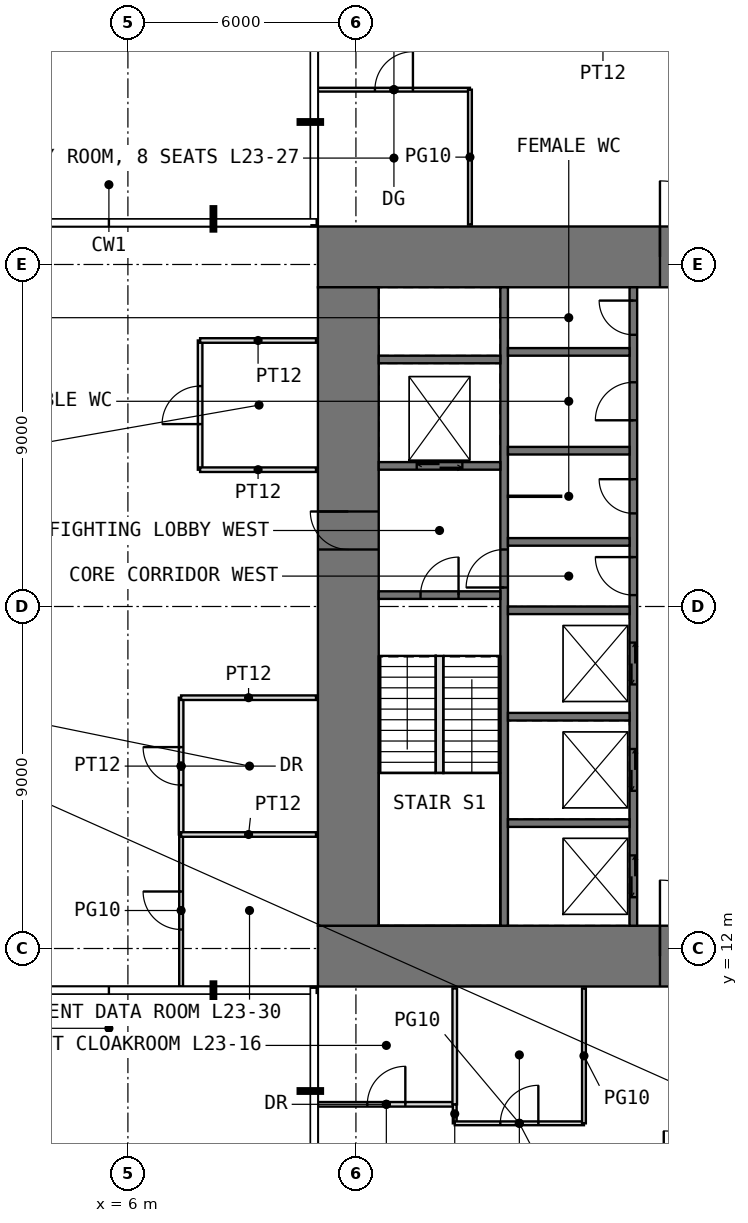
"""IFC4 building model, lengths in metres.
Left out: names, types, materials, properties, quantities, classifications, styles, units other than length and angle.
Written with IfcOpenShell. Run it as: python <this file> out.ifc"""

import sys

from ifc_helpers import new_model, si_unit, direction, frame, frame_2d, origin, place, context, subcontext, project, spatial, rectangle, extrude, element, fill, save


model = new_model("IFC4")
c1 = context("Model", 3, precision=1e-05, world=origin(), true_north=direction((0.0, 1.0)))
c2 = subcontext(c1, "Body", "Model", "MODEL_VIEW")
j1 = project(units=[si_unit("LENGTHUNIT", "METRE"), si_unit("PLANEANGLEUNIT", "RADIAN")], contexts=[c1])
p1 = place(None, origin())
s1 = spatial("IfcSite", under=j1, at=p1, CompositionType="ELEMENT")
p2 = place(p1, origin())
s2 = spatial("IfcBuilding", under=s1, at=p2, CompositionType="ELEMENT")
p3 = place(p2, frame((0.0, 0.0, 100.5)))
s3 = spatial("IfcBuildingStorey", under=s2, at=p3, CompositionType="ELEMENT", Elevation=100.5)
p4 = place(p3, frame((11.0, 11.8, -0.05), z_axis=(0.0, 0.0, 1.0), x_axis=(1.0, 0.0, 0.0)))
e1 = element("IfcWall", 1, at=p4, inside=s3, PredefinedType="SHEAR", context=c2, shape_type="SweptSolid", body=[
    extrude(rectangle(XDim=20.0, YDim=1.6, at=frame_2d((10.0, 0.0))), origin(), (0.0, 0.0, 1.0), 4.0),
])
p5 = place(p4, frame((9.0, 0.0, 0.05)))
e2 = element("IfcOpeningElement", 2, at=p5, cuts=e1, PredefinedType="OPENING", context=c2, shape_type="SweptSolid", body=[
    extrude(rectangle(XDim=2.0, YDim=2.2, at=frame_2d((1.0, 1.1))), frame((0.0, 0.81, 0.0), z_axis=(0.0, -1.0, 0.0), x_axis=(1.0, 0.0, 0.0)), (0.0, 0.0, 1.0), 1.62),
])
p6 = place(p3, frame((11.0, 30.2, -0.05), z_axis=(0.0, 0.0, 1.0), x_axis=(1.0, 0.0, 0.0)))
e3 = element("IfcWall", 3, at=p6, inside=s3, PredefinedType="SHEAR", context=c2, shape_type="SweptSolid", body=[
    extrude(rectangle(XDim=20.0, YDim=1.6, at=frame_2d((10.0, 0.0))), origin(), (0.0, 0.0, 1.0), 4.0),
])
p7 = place(p6, frame((9.0, 0.0, 0.05)))
e4 = element("IfcOpeningElement", 4, at=p7, cuts=e3, PredefinedType="OPENING", context=c2, shape_type="SweptSolid", body=[
    extrude(rectangle(XDim=2.0, YDim=2.2, at=frame_2d((1.0, 1.1))), frame((0.0, 0.81, 0.0), z_axis=(0.0, -1.0, 0.0), x_axis=(1.0, 0.0, 0.0)), (0.0, 0.0, 1.0), 1.62),
])
p8 = place(p3, frame((11.8, 12.6, -0.05), z_axis=(0.0, 0.0, 1.0), x_axis=(0.0, 1.0, 0.0)))
e5 = element("IfcWall", 5, at=p8, inside=s3, PredefinedType="SHEAR", context=c2, shape_type="SweptSolid", body=[
    extrude(rectangle(XDim=16.8, YDim=1.6, at=frame_2d((8.4, 0.0))), origin(), (0.0, 0.0, 1.0), 4.0),
])
p9 = place(p8, frame((9.9, 0.0, 0.05)))
e6 = element("IfcOpeningElement", 6, at=p9, cuts=e5, PredefinedType="OPENING", context=c2, shape_type="SweptSolid", body=[
    extrude(rectangle(XDim=1.0, YDim=2.2, at=frame_2d((0.5, 1.1))), frame((0.0, 0.81, 0.0), z_axis=(0.0, -1.0, 0.0), x_axis=(1.0, 0.0, 0.0)), (0.0, 0.0, 1.0), 1.62),
])
p10 = place(p3, frame((15.9, 12.6, -0.05), z_axis=(0.0, 0.0, 1.0), x_axis=(0.0, 1.0, 0.0)))
e7 = element("IfcWall", 7, at=p10, inside=s3, PredefinedType="SHEAR", context=c2, shape_type="SweptSolid", body=[
    extrude(rectangle(XDim=16.8, YDim=0.2, at=frame_2d((8.4, 0.0))), origin(), (0.0, 0.0, 1.0), 4.0),
])
p11 = place(p10, frame((8.9, 0.0, 0.05)))
e8 = element("IfcOpeningElement", 8, at=p11, cuts=e7, PredefinedType="OPENING", context=c2, shape_type="SweptSolid", body=[
    extrude(rectangle(XDim=1.0, YDim=2.2, at=frame_2d((0.5, 1.1))), frame((0.0, 0.11, 0.0), z_axis=(0.0, -1.0, 0.0), x_axis=(1.0, 0.0, 0.0)), (0.0, 0.0, 1.0), 0.22),
])
p12 = place(p3, frame((19.3, 12.6, -0.05), z_axis=(0.0, 0.0, 1.0), x_axis=(0.0, 1.0, 0.0)))
e9 = element("IfcWall", 9, at=p12, inside=s3, PredefinedType="SHEAR", context=c2, shape_type="SweptSolid", body=[
    extrude(rectangle(XDim=16.8, YDim=0.2, at=frame_2d((8.4, 0.0))), origin(), (0.0, 0.0, 1.0), 4.0),
])
p13 = place(p12, frame((8.7, 0.0, 0.05)))
e10 = element("IfcOpeningElement", 10, at=p13, cuts=e9, PredefinedType="OPENING", context=c2, shape_type="SweptSolid", body=[
    extrude(rectangle(XDim=1.0, YDim=2.2, at=frame_2d((0.5, 1.1))), frame((0.0, 0.11, 0.0), z_axis=(0.0, -1.0, 0.0), x_axis=(1.0, 0.0, 0.0)), (0.0, 0.0, 1.0), 0.22),
])
p14 = place(p12, frame((10.85, 0.0, 0.05)))
e11 = element("IfcOpeningElement", 11, at=p14, cuts=e9, PredefinedType="OPENING", context=c2, shape_type="SweptSolid", body=[
    extrude(rectangle(XDim=0.9, YDim=2.2, at=frame_2d((0.45, 1.1))), frame((0.0, 0.11, 0.0), z_axis=(0.0, -1.0, 0.0), x_axis=(1.0, 0.0, 0.0)), (0.0, 0.0, 1.0), 0.22),
])
p15 = place(p12, frame((13.3, 0.0, 0.05)))
e12 = element("IfcOpeningElement", 12, at=p15, cuts=e9, PredefinedType="OPENING", context=c2, shape_type="SweptSolid", body=[
    extrude(rectangle(XDim=1.0, YDim=2.2, at=frame_2d((0.5, 1.1))), frame((0.0, 0.11, 0.0), z_axis=(0.0, -1.0, 0.0), x_axis=(1.0, 0.0, 0.0)), (0.0, 0.0, 1.0), 0.22),
])
p16 = place(p12, frame((15.55, 0.0, 0.05)))
e13 = element("IfcOpeningElement", 13, at=p16, cuts=e9, PredefinedType="OPENING", context=c2, shape_type="SweptSolid", body=[
    extrude(rectangle(XDim=0.9, YDim=2.2, at=frame_2d((0.45, 1.1))), frame((0.0, 0.11, 0.0), z_axis=(0.0, -1.0, 0.0), x_axis=(1.0, 0.0, 0.0)), (0.0, 0.0, 1.0), 0.22),
])
p17 = place(p12, frame((0.75, 0.0, 0.05)))
e14 = element("IfcOpeningElement", 14, at=p17, cuts=e9, PredefinedType="OPENING", context=c2, shape_type="SweptSolid", body=[
    extrude(rectangle(XDim=1.1, YDim=2.2, at=frame_2d((0.55, 1.1))), frame((0.0, 0.11, 0.0), z_axis=(0.0, -1.0, 0.0), x_axis=(1.0, 0.0, 0.0)), (0.0, 0.0, 1.0), 0.22),
])
p18 = place(p12, frame((3.55, 0.0, 0.05)))
e15 = element("IfcOpeningElement", 15, at=p18, cuts=e9, PredefinedType="OPENING", context=c2, shape_type="SweptSolid", body=[
    extrude(rectangle(XDim=1.1, YDim=2.2, at=frame_2d((0.55, 1.1))), frame((0.0, 0.11, 0.0), z_axis=(0.0, -1.0, 0.0), x_axis=(1.0, 0.0, 0.0)), (0.0, 0.0, 1.0), 0.22),
])
p19 = place(p12, frame((6.35, 0.0, 0.05)))
e16 = element("IfcOpeningElement", 16, at=p19, cuts=e9, PredefinedType="OPENING", context=c2, shape_type="SweptSolid", body=[
    extrude(rectangle(XDim=1.1, YDim=2.2, at=frame_2d((0.55, 1.1))), frame((0.0, 0.11, 0.0), z_axis=(0.0, -1.0, 0.0), x_axis=(1.0, 0.0, 0.0)), (0.0, 0.0, 1.0), 0.22),
])
p20 = place(p3, frame((12.6, 21.3, -0.05), z_axis=(0.0, 0.0, 1.0), x_axis=(1.0, 0.0, 0.0)))
e17 = element("IfcWall", 17, at=p20, inside=s3, PredefinedType="SHEAR", context=c2, shape_type="SweptSolid", body=[
    extrude(rectangle(XDim=3.2, YDim=0.2, at=frame_2d((1.6, 0.0))), origin(), (0.0, 0.0, 1.0), 4.0),
])
p21 = place(p20, frame((1.1, 0.0, 0.05)))
e18 = element("IfcOpeningElement", 18, at=p21, cuts=e17, PredefinedType="OPENING", context=c2, shape_type="SweptSolid", body=[
    extrude(rectangle(XDim=1.0, YDim=2.2, at=frame_2d((0.5, 1.1))), frame((0.0, 0.11, 0.0), z_axis=(0.0, -1.0, 0.0), x_axis=(1.0, 0.0, 0.0)), (0.0, 0.0, 1.0), 0.22),
])
p22 = place(p3, frame((12.6, 24.7, -0.05), z_axis=(0.0, 0.0, 1.0), x_axis=(1.0, 0.0, 0.0)))
e19 = element("IfcWall", 19, at=p22, inside=s3, PredefinedType="SHEAR", context=c2, shape_type="SweptSolid", body=[
    extrude(rectangle(XDim=3.2, YDim=0.2, at=frame_2d((1.6, 0.0))), origin(), (0.0, 0.0, 1.0), 4.0),
])
p23 = place(p22, frame((1.0, 0.0, 0.05)))
e20 = element("IfcOpeningElement", 20, at=p23, cuts=e19, PredefinedType="OPENING", context=c2, shape_type="SweptSolid", body=[
    extrude(rectangle(XDim=1.2, YDim=2.2, at=frame_2d((0.6, 1.1))), frame((0.0, 0.11, 0.0), z_axis=(0.0, -1.0, 0.0), x_axis=(1.0, 0.0, 0.0)), (0.0, 0.0, 1.0), 0.22),
])
for number, where, z_axis, x_axis in (
    (21, (12.6, 27.5, -0.05), (0.0, 0.0, 1.0), (1.0, 0.0, 0.0)),
    (22, (16.0, 15.3, -0.05), (0.0, 0.0, 1.0), (1.0, 0.0, 0.0)),
    (23, (16.0, 18.1, -0.05), (0.0, 0.0, 1.0), (1.0, 0.0, 0.0)),
    (24, (16.0, 20.9, -0.05), (0.0, 0.0, 1.0), (1.0, 0.0, 0.0)),
    (25, (16.0, 22.7, -0.05), (0.0, 0.0, 1.0), (1.0, 0.0, 0.0)),
    (26, (16.0, 25.1, -0.05), (0.0, 0.0, 1.0), (1.0, 0.0, 0.0)),
    (27, (16.0, 27.7, -0.05), (0.0, 0.0, 1.0), (1.0, 0.0, 0.0)),
):
    element("IfcWall", number, at=place(p3, frame(where, z_axis=z_axis, x_axis=x_axis)), inside=s3, PredefinedType="SHEAR", context=c2, shape_type="SweptSolid", body=[
        extrude(rectangle(XDim=3.2, YDim=0.2, at=frame_2d((1.6, 0.0))), origin(), (0.0, 0.0, 1.0), 4.0),
    ])
p24 = place(p3, frame((16.0, 23.9, 0.0), z_axis=(0.0, 0.0, 1.0), x_axis=(1.0, 0.0, 0.0)))
e28 = element("IfcWall", 28, at=p24, inside=s3, PredefinedType="PARTITIONING", context=c2, shape_type="SweptSolid", body=[
    extrude(rectangle(XDim=1.4, YDim=0.03, at=frame_2d((0.7, 0.0))), origin(), (0.0, 0.0, 1.0), 3.75),
])
p25 = place(p3, frame((7.4, 11.0, 0.0), z_axis=(0.0, 0.0, 1.0), x_axis=(0.0, 1.0, 0.0)))
e29 = element("IfcWall", 29, at=p25, inside=s3, PredefinedType="PARTITIONING", context=c2, shape_type="SweptSolid", body=[
    extrude(rectangle(XDim=4.0, YDim=0.1, at=frame_2d((2.0, 0.0))), origin(), (0.0, 0.0, 1.0), 3.75),
])
p26 = place(p25, frame((1.5, 0.0, 0.0)))
e30 = element("IfcOpeningElement", 30, at=p26, cuts=e29, PredefinedType="OPENING", context=c2, shape_type="SweptSolid", body=[
    extrude(rectangle(XDim=1.0, YDim=2.4, at=frame_2d((0.5, 1.2))), frame((0.0, 0.06, 0.0), z_axis=(0.0, -1.0, 0.0), x_axis=(1.0, 0.0, 0.0)), (0.0, 0.0, 1.0), 0.12),
])
p27 = place(p3, frame((7.4, 15.0, 0.0), z_axis=(0.0, 0.0, 1.0), x_axis=(0.0, 1.0, 0.0)))
e31 = element("IfcWall", 31, at=p27, inside=s3, PredefinedType="PARTITIONING", context=c2, shape_type="SweptSolid", body=[
    extrude(rectangle(XDim=3.6, YDim=0.12, at=frame_2d((1.8, 0.0))), origin(), (0.0, 0.0, 1.0), 3.75),
])
p28 = place(p27, frame((1.3, 0.0, 0.0)))
e32 = element("IfcOpeningElement", 32, at=p28, cuts=e31, PredefinedType="OPENING", context=c2, shape_type="SweptSolid", body=[
    extrude(rectangle(XDim=1.0, YDim=2.2, at=frame_2d((0.5, 1.1))), frame((0.0, 0.07, 0.0), z_axis=(0.0, -1.0, 0.0), x_axis=(1.0, 0.0, 0.0)), (0.0, 0.0, 1.0), 0.14),
])
for number, where, z_axis, x_axis in (
    (33, (7.4, 15.0, 0.0), (0.0, 0.0, 1.0), (1.0, 0.0, 0.0)),
    (34, (7.4, 18.6, 0.0), (0.0, 0.0, 1.0), (1.0, 0.0, 0.0)),
):
    element("IfcWall", number, at=place(p3, frame(where, z_axis=z_axis, x_axis=x_axis)), inside=s3, PredefinedType="PARTITIONING", context=c2, shape_type="SweptSolid", body=[
        extrude(rectangle(XDim=3.55, YDim=0.12, at=frame_2d((1.775, 0.0))), origin(), (0.0, 0.0, 1.0), 3.75),
    ])
p29 = place(p3, frame((7.9, 24.6, 0.0), z_axis=(0.0, 0.0, 1.0), x_axis=(0.0, 1.0, 0.0)))
e35 = element("IfcWall", 35, at=p29, inside=s3, PredefinedType="PARTITIONING", context=c2, shape_type="SweptSolid", body=[
    extrude(rectangle(XDim=3.4, YDim=0.12, at=frame_2d((1.7, 0.0))), origin(), (0.0, 0.0, 1.0), 3.75),
])
p30 = place(p29, frame((1.2, 0.0, 0.0)))
e36 = element("IfcOpeningElement", 36, at=p30, cuts=e35, PredefinedType="OPENING", context=c2, shape_type="SweptSolid", body=[
    extrude(rectangle(XDim=1.0, YDim=2.2, at=frame_2d((0.5, 1.1))), frame((0.0, 0.07, 0.0), z_axis=(0.0, -1.0, 0.0), x_axis=(1.0, 0.0, 0.0)), (0.0, 0.0, 1.0), 0.14),
])
for number, where, z_axis, x_axis in (
    (37, (7.9, 24.6, 0.0), (0.0, 0.0, 1.0), (1.0, 0.0, 0.0)),
    (38, (7.9, 28.0, 0.0), (0.0, 0.0, 1.0), (1.0, 0.0, 0.0)),
):
    element("IfcWall", number, at=place(p3, frame(where, z_axis=z_axis, x_axis=x_axis)), inside=s3, PredefinedType="PARTITIONING", context=c2, shape_type="SweptSolid", body=[
        extrude(rectangle(XDim=3.05, YDim=0.12, at=frame_2d((1.525, 0.0))), origin(), (0.0, 0.0, 1.0), 3.75),
    ])
p31 = place(p3, frame((11.0, 7.9, 0.0), z_axis=(0.0, 0.0, 1.0), x_axis=(1.0, 0.0, 0.0)))
e39 = element("IfcWall", 39, at=p31, inside=s3, PredefinedType="PARTITIONING", context=c2, shape_type="SweptSolid", body=[
    extrude(rectangle(XDim=3.6, YDim=0.12, at=frame_2d((1.8, 0.0))), origin(), (0.0, 0.0, 1.0), 3.75),
])
p32 = place(p31, frame((1.3, 0.0, 0.0)))
e40 = element("IfcOpeningElement", 40, at=p32, cuts=e39, PredefinedType="OPENING", context=c2, shape_type="SweptSolid", body=[
    extrude(rectangle(XDim=1.0, YDim=2.2, at=frame_2d((0.5, 1.1))), frame((0.0, 0.07, 0.0), z_axis=(0.0, -1.0, 0.0), x_axis=(1.0, 0.0, 0.0)), (0.0, 0.0, 1.0), 0.14),
])
p33 = place(p3, frame((11.0, 34.6, 0.0), z_axis=(0.0, 0.0, 1.0), x_axis=(1.0, 0.0, 0.0)))
e41 = element("IfcWall", 41, at=p33, inside=s3, PredefinedType="PARTITIONING", context=c2, shape_type="SweptSolid", body=[
    extrude(rectangle(XDim=4.0, YDim=0.1, at=frame_2d((2.0, 0.0))), origin(), (0.0, 0.0, 1.0), 3.75),
])
p34 = place(p33, frame((1.5, 0.0, 0.0)))
e42 = element("IfcOpeningElement", 42, at=p34, cuts=e41, PredefinedType="OPENING", context=c2, shape_type="SweptSolid", body=[
    extrude(rectangle(XDim=1.0, YDim=2.4, at=frame_2d((0.5, 1.2))), frame((0.0, 0.06, 0.0), z_axis=(0.0, -1.0, 0.0), x_axis=(1.0, 0.0, 0.0)), (0.0, 0.0, 1.0), 0.12),
])
p35 = place(p3, frame((14.6, 7.4, 0.0), z_axis=(0.0, 0.0, 1.0), x_axis=(0.0, 1.0, 0.0)))
e43 = element("IfcWall", 43, at=p35, inside=s3, PredefinedType="PARTITIONING", context=c2, shape_type="SweptSolid", body=[
    extrude(rectangle(XDim=0.5, YDim=0.1, at=frame_2d((0.25, 0.0))), origin(), (0.0, 0.0, 1.0), 3.75),
])
p36 = place(p3, frame((14.6, 7.4, 0.0), z_axis=(0.0, 0.0, 1.0), x_axis=(1.0, 0.0, 0.0)))
e44 = element("IfcWall", 44, at=p36, inside=s3, PredefinedType="PARTITIONING", context=c2, shape_type="SweptSolid", body=[
    extrude(rectangle(XDim=3.4, YDim=0.1, at=frame_2d((1.7, 0.0))), origin(), (0.0, 0.0, 1.0), 3.75),
])
p37 = place(p36, frame((1.2, 0.0, 0.0)))
e45 = element("IfcOpeningElement", 45, at=p37, cuts=e44, PredefinedType="OPENING", context=c2, shape_type="SweptSolid", body=[
    extrude(rectangle(XDim=1.0, YDim=2.4, at=frame_2d((0.5, 1.2))), frame((0.0, 0.06, 0.0), z_axis=(0.0, -1.0, 0.0), x_axis=(1.0, 0.0, 0.0)), (0.0, 0.0, 1.0), 0.12),
])
p38 = place(p3, frame((14.6, 7.9, 0.0), z_axis=(0.0, 0.0, 1.0), x_axis=(0.0, 1.0, 0.0)))
e46 = element("IfcWall", 46, at=p38, inside=s3, PredefinedType="PARTITIONING", context=c2, shape_type="SweptSolid", body=[
    extrude(rectangle(XDim=3.05, YDim=0.12, at=frame_2d((1.525, 0.0))), origin(), (0.0, 0.0, 1.0), 3.75),
])
for number, where, z_axis, x_axis in (
    (47, (15.0, 31.05, 0.0), (0.0, 0.0, 1.0), (0.0, 1.0, 0.0)),
    (48, (18.0, 7.4, 0.0), (0.0, 0.0, 1.0), (0.0, 1.0, 0.0)),
):
    element("IfcWall", number, at=place(p3, frame(where, z_axis=z_axis, x_axis=x_axis)), inside=s3, PredefinedType="PARTITIONING", context=c2, shape_type="SweptSolid", body=[
        extrude(rectangle(XDim=3.55, YDim=0.1, at=frame_2d((1.775, 0.0))), origin(), (0.0, 0.0, 1.0), 3.75),
    ])
p39 = place(p3, frame((14.2, 16.62, 0.0), z_axis=(0.0, 0.0, 1.0), x_axis=(0.0, 1.0, 0.0)))
e49 = element("IfcWall", 49, at=p39, inside=s3, PredefinedType="PARTITIONING", context=c2, shape_type="SweptSolid", body=[
    extrude(rectangle(XDim=3.08, YDim=0.2, at=frame_2d((1.54, 0.0))), origin(), (0.0, 0.0, 1.0), 4.0),
])
p40 = place(p5, origin())
e50 = element("IfcDoor", 50, at=p40, inside=s3, OperationType="DOUBLE_DOOR_SINGLE_SWING", PredefinedType="DOOR", context=c2, shape_type="SweptSolid", body=[
    extrude(rectangle(XDim=2.0, YDim=2.2, at=frame_2d((1.0, 1.1))), frame((0.0, 0.025, 0.0), z_axis=(0.0, -1.0, 0.0), x_axis=(1.0, 0.0, 0.0)), (0.0, 0.0, 1.0), 0.05),
])
fill(e2, e50)
p41 = place(p7, origin())
e51 = element("IfcDoor", 51, at=p41, inside=s3, OperationType="DOUBLE_DOOR_SINGLE_SWING", PredefinedType="DOOR", context=c2, shape_type="SweptSolid", body=[
    extrude(rectangle(XDim=2.0, YDim=2.2, at=frame_2d((1.0, 1.1))), frame((0.0, 0.025, 0.0), z_axis=(0.0, -1.0, 0.0), x_axis=(1.0, 0.0, 0.0)), (0.0, 0.0, 1.0), 0.05),
])
fill(e4, e51)
p42 = place(p9, origin())
e52 = element("IfcDoor", 52, at=p42, inside=s3, OperationType="SINGLE_SWING_RIGHT", PredefinedType="DOOR", context=c2, shape_type="SweptSolid", body=[
    extrude(rectangle(XDim=1.0, YDim=2.2, at=frame_2d((0.5, 1.1))), frame((0.0, 0.025, 0.0), z_axis=(0.0, -1.0, 0.0), x_axis=(1.0, 0.0, 0.0)), (0.0, 0.0, 1.0), 0.05),
])
fill(e6, e52)
p43 = place(p21, origin())
e53 = element("IfcDoor", 53, at=p43, inside=s3, OperationType="SINGLE_SWING_RIGHT", PredefinedType="DOOR", context=c2, shape_type="SweptSolid", body=[
    extrude(rectangle(XDim=1.0, YDim=2.2, at=frame_2d((0.5, 1.1))), frame((0.0, 0.025, 0.0), z_axis=(0.0, -1.0, 0.0), x_axis=(1.0, 0.0, 0.0)), (0.0, 0.0, 1.0), 0.05),
])
fill(e18, e53)
p44 = place(p11, origin())
e54 = element("IfcDoor", 54, at=p44, inside=s3, OperationType="SINGLE_SWING_LEFT", PredefinedType="DOOR", context=c2, shape_type="SweptSolid", body=[
    extrude(rectangle(XDim=1.0, YDim=2.2, at=frame_2d((0.5, 1.1))), frame((0.0, 0.025, 0.0), z_axis=(0.0, -1.0, 0.0), x_axis=(1.0, 0.0, 0.0)), (0.0, 0.0, 1.0), 0.05),
])
fill(e8, e54)
p45 = place(p13, origin())
e55 = element("IfcDoor", 55, at=p45, inside=s3, OperationType="SINGLE_SWING_RIGHT", PredefinedType="DOOR", context=c2, shape_type="SweptSolid", body=[
    extrude(rectangle(XDim=1.0, YDim=2.2, at=frame_2d((0.5, 1.1))), frame((0.0, 0.025, 0.0), z_axis=(0.0, -1.0, 0.0), x_axis=(1.0, 0.0, 0.0)), (0.0, 0.0, 1.0), 0.05),
])
fill(e10, e55)
p46 = place(p14, origin())
e56 = element("IfcDoor", 56, at=p46, inside=s3, OperationType="SINGLE_SWING_RIGHT", PredefinedType="DOOR", context=c2, shape_type="SweptSolid", body=[
    extrude(rectangle(XDim=0.9, YDim=2.2, at=frame_2d((0.45, 1.1))), frame((0.0, 0.025, 0.0), z_axis=(0.0, -1.0, 0.0), x_axis=(1.0, 0.0, 0.0)), (0.0, 0.0, 1.0), 0.05),
])
fill(e11, e56)
p47 = place(p15, origin())
e57 = element("IfcDoor", 57, at=p47, inside=s3, OperationType="SINGLE_SWING_LEFT", PredefinedType="DOOR", context=c2, shape_type="SweptSolid", body=[
    extrude(rectangle(XDim=1.0, YDim=2.2, at=frame_2d((0.5, 1.1))), frame((0.0, 0.025, 0.0), z_axis=(0.0, -1.0, 0.0), x_axis=(1.0, 0.0, 0.0)), (0.0, 0.0, 1.0), 0.05),
])
fill(e12, e57)
p48 = place(p16, origin())
e58 = element("IfcDoor", 58, at=p48, inside=s3, OperationType="SINGLE_SWING_RIGHT", PredefinedType="DOOR", context=c2, shape_type="SweptSolid", body=[
    extrude(rectangle(XDim=0.9, YDim=2.2, at=frame_2d((0.45, 1.1))), frame((0.0, 0.025, 0.0), z_axis=(0.0, -1.0, 0.0), x_axis=(1.0, 0.0, 0.0)), (0.0, 0.0, 1.0), 0.05),
])
fill(e13, e58)
p49 = place(p32, origin())
e59 = element("IfcDoor", 59, at=p49, inside=s3, OperationType="SINGLE_SWING_RIGHT", PredefinedType="DOOR", context=c2, shape_type="SweptSolid", body=[
    extrude(rectangle(XDim=1.0, YDim=2.2, at=frame_2d((0.5, 1.1))), frame((0.0, 0.025, 0.0), z_axis=(0.0, -1.0, 0.0), x_axis=(1.0, 0.0, 0.0)), (0.0, 0.0, 1.0), 0.05),
])
fill(e40, e59)
p50 = place(p37, origin())
e60 = element("IfcDoor", 60, at=p50, inside=s3, OperationType="SINGLE_SWING_RIGHT", PredefinedType="DOOR", context=c2, shape_type="SweptSolid", body=[
    extrude(rectangle(XDim=1.0, YDim=2.4, at=frame_2d((0.5, 1.2))), frame((0.0, 0.025, 0.0), z_axis=(0.0, -1.0, 0.0), x_axis=(1.0, 0.0, 0.0)), (0.0, 0.0, 1.0), 0.05),
])
fill(e45, e60)
p51 = place(p34, origin())
e61 = element("IfcDoor", 61, at=p51, inside=s3, OperationType="SINGLE_SWING_RIGHT", PredefinedType="DOOR", context=c2, shape_type="SweptSolid", body=[
    extrude(rectangle(XDim=1.0, YDim=2.4, at=frame_2d((0.5, 1.2))), frame((0.0, 0.025, 0.0), z_axis=(0.0, -1.0, 0.0), x_axis=(1.0, 0.0, 0.0)), (0.0, 0.0, 1.0), 0.05),
])
fill(e42, e61)
p52 = place(p26, origin())
e62 = element("IfcDoor", 62, at=p52, inside=s3, OperationType="SINGLE_SWING_RIGHT", PredefinedType="DOOR", context=c2, shape_type="SweptSolid", body=[
    extrude(rectangle(XDim=1.0, YDim=2.4, at=frame_2d((0.5, 1.2))), frame((0.0, 0.025, 0.0), z_axis=(0.0, -1.0, 0.0), x_axis=(1.0, 0.0, 0.0)), (0.0, 0.0, 1.0), 0.05),
])
fill(e30, e62)
p53 = place(p28, origin())
e63 = element("IfcDoor", 63, at=p53, inside=s3, OperationType="SINGLE_SWING_RIGHT", PredefinedType="DOOR", context=c2, shape_type="SweptSolid", body=[
    extrude(rectangle(XDim=1.0, YDim=2.2, at=frame_2d((0.5, 1.1))), frame((0.0, 0.025, 0.0), z_axis=(0.0, -1.0, 0.0), x_axis=(1.0, 0.0, 0.0)), (0.0, 0.0, 1.0), 0.05),
])
fill(e32, e63)
p54 = place(p30, origin())
e64 = element("IfcDoor", 64, at=p54, inside=s3, OperationType="SINGLE_SWING_LEFT", PredefinedType="DOOR", context=c2, shape_type="SweptSolid", body=[
    extrude(rectangle(XDim=1.0, YDim=2.2, at=frame_2d((0.5, 1.1))), frame((0.0, 0.025, 0.0), z_axis=(0.0, -1.0, 0.0), x_axis=(1.0, 0.0, 0.0)), (0.0, 0.0, 1.0), 0.05),
])
fill(e36, e64)
p55 = place(p17, origin())
e65 = element("IfcDoor", 65, at=p55, inside=s3, OperationType="DOUBLE_DOOR_SLIDING", PredefinedType="DOOR", context=c2, shape_type="SweptSolid", body=[
    extrude(rectangle(XDim=1.1, YDim=2.2, at=frame_2d((0.55, 1.1))), frame((0.0, 0.025, 0.0), z_axis=(0.0, -1.0, 0.0), x_axis=(1.0, 0.0, 0.0)), (0.0, 0.0, 1.0), 0.05),
])
fill(e14, e65)
p56 = place(p18, origin())
e66 = element("IfcDoor", 66, at=p56, inside=s3, OperationType="DOUBLE_DOOR_SLIDING", PredefinedType="DOOR", context=c2, shape_type="SweptSolid", body=[
    extrude(rectangle(XDim=1.1, YDim=2.2, at=frame_2d((0.55, 1.1))), frame((0.0, 0.025, 0.0), z_axis=(0.0, -1.0, 0.0), x_axis=(1.0, 0.0, 0.0)), (0.0, 0.0, 1.0), 0.05),
])
fill(e15, e66)
p57 = place(p19, origin())
e67 = element("IfcDoor", 67, at=p57, inside=s3, OperationType="DOUBLE_DOOR_SLIDING", PredefinedType="DOOR", context=c2, shape_type="SweptSolid", body=[
    extrude(rectangle(XDim=1.1, YDim=2.2, at=frame_2d((0.55, 1.1))), frame((0.0, 0.025, 0.0), z_axis=(0.0, -1.0, 0.0), x_axis=(1.0, 0.0, 0.0)), (0.0, 0.0, 1.0), 0.05),
])
fill(e16, e67)
p58 = place(p23, origin())
e68 = element("IfcDoor", 68, at=p58, inside=s3, OperationType="DOUBLE_DOOR_SLIDING", PredefinedType="DOOR", context=c2, shape_type="SweptSolid", body=[
    extrude(rectangle(XDim=1.2, YDim=2.2, at=frame_2d((0.6, 1.1))), frame((0.0, 0.025, 0.0), z_axis=(0.0, -1.0, 0.0), x_axis=(1.0, 0.0, 0.0)), (0.0, 0.0, 1.0), 0.05),
])
fill(e20, e68)
save(model, sys.argv[1])
